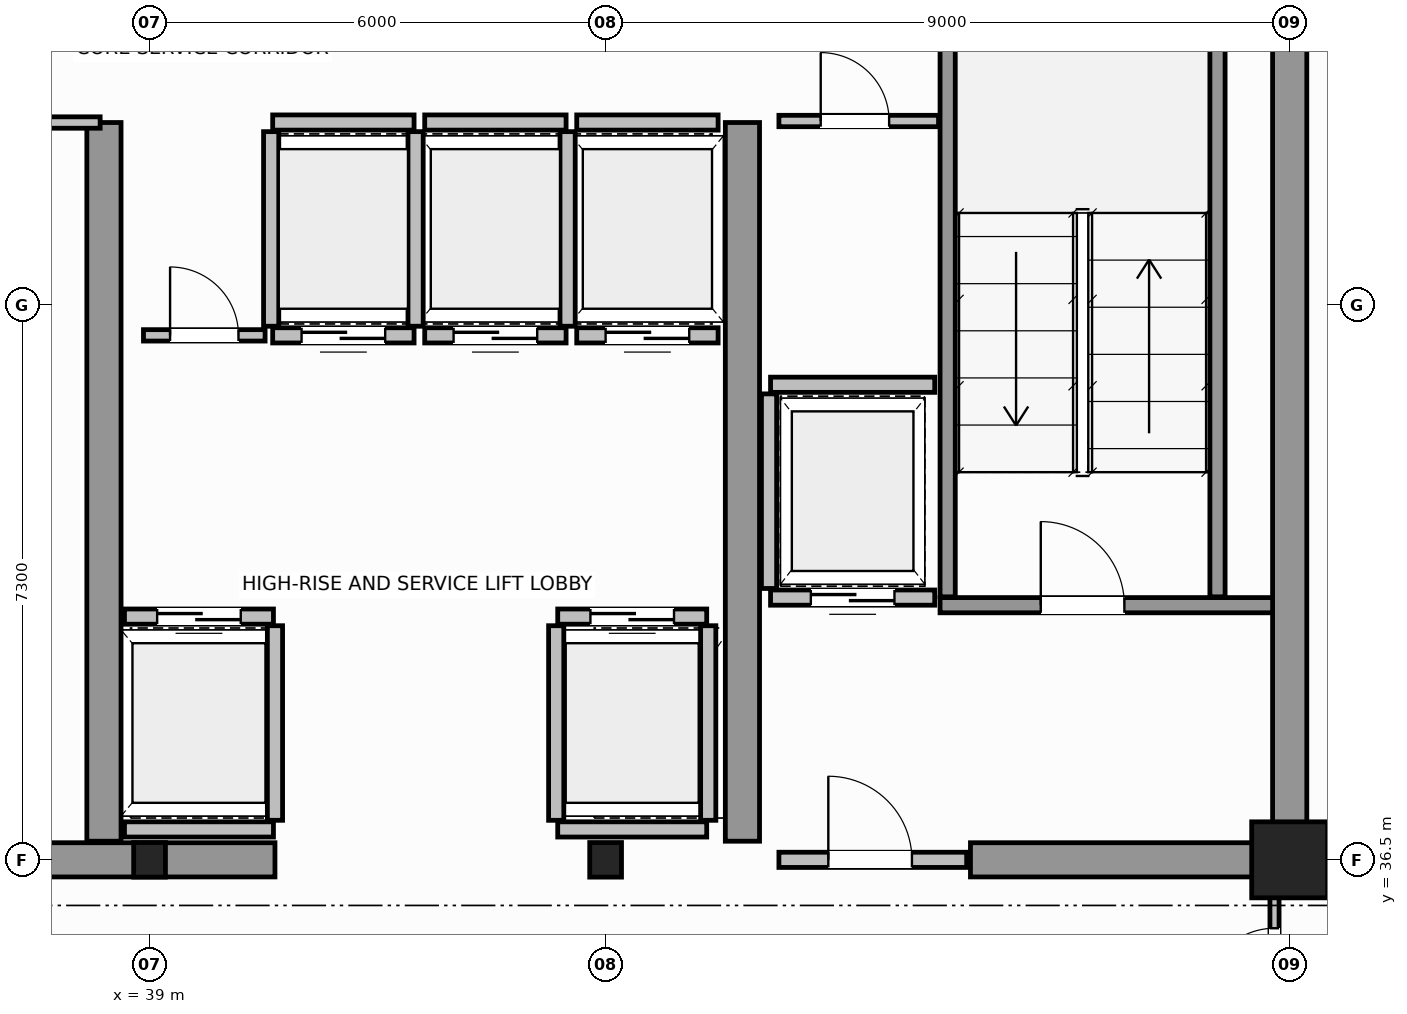
"""IFC4 building model, lengths in metres.
Left out: names, types, materials, properties, quantities, classifications, styles, units other than length and angle.
Written with IfcOpenShell. Run it as: python <this file> out.ifc"""

import sys

from ifc_helpers import new_model, si_unit, direction, frame, frame_2d, origin, origin_2d, place, context, subcontext, project, spatial, rectangle, i_section, extrude, source, transform, mapped, element, fill, save


model = new_model("IFC4")
c1 = context("Model", 3, precision=1e-05, world=origin(), true_north=direction((0.0, 1.0)))
c2 = subcontext(c1, "Body", "Model", "MODEL_VIEW")
j1 = project(units=[si_unit("LENGTHUNIT", "METRE"), si_unit("PLANEANGLEUNIT", "RADIAN")], contexts=[c1])
p1 = place(None, origin())
s1 = spatial("IfcSite", under=j1, at=p1, CompositionType="ELEMENT")
p2 = place(p1, origin())
s2 = spatial("IfcBuilding", under=s1, at=p2, CompositionType="ELEMENT")
p3 = place(p2, frame((0.0, 0.0, 257.4)))
s3 = spatial("IfcBuildingStorey", under=s2, at=p3, CompositionType="ELEMENT", Elevation=257.4)
m1 = source(origin(), c2, "Body", "SweptSolid", [
    extrude(i_section(OverallWidth=0.418, OverallDepth=0.455, WebThickness=0.042, FlangeThickness=0.058, FilletRadius=0.015, at=origin_2d()), origin(), (0.0, 0.0, 1.0), 3.8),
])
for number, where, z_axis, x_axis in (
    (1, (39.0, 36.5, 0.0), (0.0, 0.0, 1.0), (1.0, 0.0, 0.0)),
    (2, (45.0, 36.5, 0.0), (0.0, 0.0, 1.0), (1.0, 0.0, 0.0)),
):
    element("IfcColumn", number, at=place(p3, frame(where, z_axis=z_axis, x_axis=x_axis)), inside=s3, PredefinedType="COLUMN", context=c2, shape_type="MappedRepresentation", body=[
        mapped(m1, transform((0.0, 0.0, 0.0), scale=1.0)),
    ])
m2 = source(origin(), c2, "Body", "SweptSolid", [
    extrude(rectangle(XDim=1.0, YDim=1.0, at=origin_2d()), origin(), (0.0, 0.0, 1.0), 3.8),
])
p4 = place(p3, frame((54.0, 36.5, 0.0), z_axis=(0.0, 0.0, 1.0), x_axis=(1.0, 0.0, 0.0)))
e3 = element("IfcColumn", 3, at=p4, inside=s3, PredefinedType="COLUMN", context=c2, shape_type="MappedRepresentation", body=[
    mapped(m2, transform((0.0, 0.0, 0.0), scale=1.0)),
])
p5 = place(p3, frame((54.0, 36.5, 0.0), z_axis=(0.0, 0.0, 1.0), x_axis=(0.0, 1.0, 0.0)))
e4 = element("IfcWall", 4, at=p5, inside=s3, PredefinedType="SHEAR", context=c2, shape_type="SweptSolid", body=[
    extrude(rectangle(XDim=14.5, YDim=0.45, at=frame_2d((7.25, 0.0))), origin(), (0.0, 0.0, 1.0), 3.8),
])
p6 = place(p3, frame((36.15, 36.5, 0.0), z_axis=(0.0, 0.0, 1.0), x_axis=(1.0, 0.0, 0.0)))
e5 = element("IfcWall", 5, at=p6, inside=s3, PredefinedType="SHEAR", context=c2, shape_type="SweptSolid", body=[
    extrude(rectangle(XDim=4.5, YDim=0.45, at=frame_2d((2.25, 0.0))), origin(), (0.0, 0.0, 1.0), 3.8),
])
p7 = place(p3, frame((49.8, 36.5, 0.0), z_axis=(0.0, 0.0, 1.0), x_axis=(1.0, 0.0, 0.0)))
e6 = element("IfcWall", 6, at=p7, inside=s3, PredefinedType="SHEAR", context=c2, shape_type="SweptSolid", body=[
    extrude(rectangle(XDim=3.955, YDim=0.45, at=frame_2d((1.978, 0.0))), origin(), (0.0, 0.0, 1.0), 2.58),
])
for number, where, z_axis, x_axis in (
    (7, (38.4, 36.745, 0.0), (0.0, 0.0, 1.0), (0.0, 1.0, 0.0)),
    (8, (46.8, 36.745, 0.0), (0.0, 0.0, 1.0), (0.0, 1.0, 0.0)),
):
    element("IfcWall", number, at=place(p3, frame(where, z_axis=z_axis, x_axis=x_axis)), inside=s3, PredefinedType="SHEAR", context=c2, shape_type="SweptSolid", body=[
        extrude(rectangle(XDim=9.455, YDim=0.45, at=frame_2d((4.728, 0.0))), origin(), (0.0, 0.0, 1.0), 3.8),
    ])
p8 = place(p3, frame((49.4, 39.85, 0.0), z_axis=(0.0, 0.0, 1.0), x_axis=(1.0, 0.0, 0.0)))
e9 = element("IfcWall", 9, at=p8, inside=s3, PredefinedType="SOLIDWALL", context=c2, shape_type="SweptSolid", body=[
    extrude(rectangle(XDim=4.375, YDim=0.2, at=frame_2d((2.188, 0.0))), origin(), (0.0, 0.0, 1.0), 3.8),
])
p9 = place(p8, frame((1.325, 0.0, 0.0)))
e10 = element("IfcOpeningElement", 10, at=p9, cuts=e9, PredefinedType="OPENING", context=c2, shape_type="SweptSolid", body=[
    extrude(rectangle(XDim=1.1, YDim=2.15, at=frame_2d((0.55, 1.075))), frame((0.0, 0.11, 0.0), z_axis=(0.0, -1.0, 0.0), x_axis=(1.0, 0.0, 0.0)), (0.0, 0.0, 1.0), 0.22),
])
for number, where, z_axis, x_axis in (
    (11, (49.5, 39.96, 0.0), (0.0, 0.0, 1.0), (0.0, 1.0, 0.0)),
    (12, (53.05, 39.96, 0.0), (0.0, 0.0, 1.0), (0.0, 1.0, 0.0)),
):
    element("IfcWall", number, at=place(p3, frame(where, z_axis=z_axis, x_axis=x_axis)), inside=s3, PredefinedType="SOLIDWALL", context=c2, shape_type="SweptSolid", body=[
        extrude(rectangle(XDim=9.93, YDim=0.2, at=frame_2d((4.965, 0.0))), origin(), (0.0, 0.0, 1.0), 3.8),
    ])
p10 = place(p3, frame((47.28, 36.5, 0.0), z_axis=(0.0, 0.0, 1.0), x_axis=(1.0, 0.0, 0.0)))
e13 = element("IfcWall", 13, at=p10, inside=s3, PredefinedType="SOLIDWALL", context=c2, shape_type="SweptSolid", body=[
    extrude(rectangle(XDim=2.47, YDim=0.2, at=frame_2d((1.235, 0.0))), origin(), (0.0, 0.0, 1.0), 2.57),
])
p11 = place(p10, frame((0.65, 0.0, 0.0)))
e14 = element("IfcOpeningElement", 14, at=p11, cuts=e13, PredefinedType="OPENING", context=c2, shape_type="SweptSolid", body=[
    extrude(rectangle(XDim=1.1, YDim=2.15, at=frame_2d((0.55, 1.075))), frame((0.0, 0.11, 0.0), z_axis=(0.0, -1.0, 0.0), x_axis=(1.0, 0.0, 0.0)), (0.0, 0.0, 1.0), 0.22),
])
p12 = place(p3, frame((38.67, 39.7, 0.0), z_axis=(0.0, 0.0, 1.0), x_axis=(1.0, 0.0, 0.0)))
e15 = element("IfcWall", 15, at=p12, inside=s3, PredefinedType="SOLIDWALL", context=c2, shape_type="SweptSolid", body=[
    extrude(rectangle(XDim=1.96, YDim=0.2, at=frame_2d((0.98, 0.0))), origin(), (0.0, 0.0, 1.0), 3.58),
])
p13 = place(p12, frame((0.43, 0.0, 0.0)))
e16 = element("IfcOpeningElement", 16, at=p13, cuts=e15, PredefinedType="OPENING", context=c2, shape_type="SweptSolid", body=[
    extrude(rectangle(XDim=1.1, YDim=2.15, at=frame_2d((0.55, 1.075))), frame((0.0, 0.11, 0.0), z_axis=(0.0, -1.0, 0.0), x_axis=(1.0, 0.0, 0.0)), (0.0, 0.0, 1.0), 0.22),
])
p14 = place(p3, frame((38.67, 36.9, 0.0), z_axis=(0.0, 0.0, 1.0), x_axis=(1.0, 0.0, 0.0)))
e17 = element("IfcWall", 17, at=p14, inside=s3, PredefinedType="SOLIDWALL", context=c2, shape_type="SweptSolid", body=[
    extrude(rectangle(XDim=1.96, YDim=0.2, at=frame_2d((0.98, 0.0))), origin(), (0.0, 0.0, 1.0), 3.58),
])
p15 = place(p3, frame((40.65, 37.02, 0.0), z_axis=(0.0, 0.0, 1.0), x_axis=(0.0, 1.0, 0.0)))
e18 = element("IfcWall", 18, at=p15, inside=s3, PredefinedType="SOLIDWALL", context=c2, shape_type="SweptSolid", body=[
    extrude(rectangle(XDim=2.56, YDim=0.2, at=frame_2d((1.28, 0.0))), origin(), (0.0, 0.0, 1.0), 3.58),
])
p16 = place(p3, frame((44.37, 39.7, 0.0), z_axis=(0.0, 0.0, 1.0), x_axis=(1.0, 0.0, 0.0)))
e19 = element("IfcWall", 19, at=p16, inside=s3, PredefinedType="SOLIDWALL", context=c2, shape_type="SweptSolid", body=[
    extrude(rectangle(XDim=1.96, YDim=0.2, at=frame_2d((0.98, 0.0))), origin(), (0.0, 0.0, 1.0), 3.58),
])
p17 = place(p16, frame((0.43, 0.0, 0.0)))
e20 = element("IfcOpeningElement", 20, at=p17, cuts=e19, PredefinedType="OPENING", context=c2, shape_type="SweptSolid", body=[
    extrude(rectangle(XDim=1.1, YDim=2.15, at=frame_2d((0.55, 1.075))), frame((0.0, 0.11, 0.0), z_axis=(0.0, -1.0, 0.0), x_axis=(1.0, 0.0, 0.0)), (0.0, 0.0, 1.0), 0.22),
])
p18 = place(p3, frame((44.37, 36.9, 0.0), z_axis=(0.0, 0.0, 1.0), x_axis=(1.0, 0.0, 0.0)))
e21 = element("IfcWall", 21, at=p18, inside=s3, PredefinedType="SOLIDWALL", context=c2, shape_type="SweptSolid", body=[
    extrude(rectangle(XDim=1.96, YDim=0.2, at=frame_2d((0.98, 0.0))), origin(), (0.0, 0.0, 1.0), 2.57),
])
for number, where, z_axis, x_axis in (
    (22, (44.35, 37.02, 0.0), (0.0, 0.0, 1.0), (0.0, 1.0, 0.0)),
    (23, (46.35, 37.02, 0.0), (0.0, 0.0, 1.0), (0.0, 1.0, 0.0)),
):
    element("IfcWall", number, at=place(p3, frame(where, z_axis=z_axis, x_axis=x_axis)), inside=s3, PredefinedType="SOLIDWALL", context=c2, shape_type="SweptSolid", body=[
        extrude(rectangle(XDim=2.56, YDim=0.2, at=frame_2d((1.28, 0.0))), origin(), (0.0, 0.0, 1.0), 3.58),
    ])
p19 = place(p3, frame((40.62, 43.4, 0.0), z_axis=(0.0, 0.0, 1.0), x_axis=(1.0, 0.0, 0.0)))
e24 = element("IfcWall", 24, at=p19, inside=s3, PredefinedType="SOLIDWALL", context=c2, shape_type="SweptSolid", body=[
    extrude(rectangle(XDim=1.86, YDim=0.2, at=frame_2d((0.93, 0.0))), origin(), (0.0, 0.0, 1.0), 3.58),
])
p20 = place(p19, frame((0.38, 0.0, 0.0)))
e25 = element("IfcOpeningElement", 25, at=p20, cuts=e24, PredefinedType="OPENING", context=c2, shape_type="SweptSolid", body=[
    extrude(rectangle(XDim=1.1, YDim=2.15, at=frame_2d((0.55, 1.075))), frame((0.0, 0.11, 0.0), z_axis=(0.0, -1.0, 0.0), x_axis=(1.0, 0.0, 0.0)), (0.0, 0.0, 1.0), 0.22),
])
p21 = place(p3, frame((40.62, 46.2, 0.0), z_axis=(0.0, 0.0, 1.0), x_axis=(1.0, 0.0, 0.0)))
e26 = element("IfcWall", 26, at=p21, inside=s3, PredefinedType="SOLIDWALL", context=c2, shape_type="SweptSolid", body=[
    extrude(rectangle(XDim=1.86, YDim=0.2, at=frame_2d((0.93, 0.0))), origin(), (0.0, 0.0, 1.0), 3.58),
])
for number, where, z_axis, x_axis in (
    (27, (40.6, 43.52, 0.0), (0.0, 0.0, 1.0), (0.0, 1.0, 0.0)),
    (28, (42.5, 43.52, 0.0), (0.0, 0.0, 1.0), (0.0, 1.0, 0.0)),
):
    element("IfcWall", number, at=place(p3, frame(where, z_axis=z_axis, x_axis=x_axis)), inside=s3, PredefinedType="SOLIDWALL", context=c2, shape_type="SweptSolid", body=[
        extrude(rectangle(XDim=2.56, YDim=0.2, at=frame_2d((1.28, 0.0))), origin(), (0.0, 0.0, 1.0), 3.58),
    ])
p22 = place(p3, frame((42.62, 43.4, 0.0), z_axis=(0.0, 0.0, 1.0), x_axis=(1.0, 0.0, 0.0)))
e29 = element("IfcWall", 29, at=p22, inside=s3, PredefinedType="SOLIDWALL", context=c2, shape_type="SweptSolid", body=[
    extrude(rectangle(XDim=1.86, YDim=0.2, at=frame_2d((0.93, 0.0))), origin(), (0.0, 0.0, 1.0), 3.58),
])
p23 = place(p22, frame((0.38, 0.0, 0.0)))
e30 = element("IfcOpeningElement", 30, at=p23, cuts=e29, PredefinedType="OPENING", context=c2, shape_type="SweptSolid", body=[
    extrude(rectangle(XDim=1.1, YDim=2.15, at=frame_2d((0.55, 1.075))), frame((0.0, 0.11, 0.0), z_axis=(0.0, -1.0, 0.0), x_axis=(1.0, 0.0, 0.0)), (0.0, 0.0, 1.0), 0.22),
])
p24 = place(p3, frame((42.62, 46.2, 0.0), z_axis=(0.0, 0.0, 1.0), x_axis=(1.0, 0.0, 0.0)))
e31 = element("IfcWall", 31, at=p24, inside=s3, PredefinedType="SOLIDWALL", context=c2, shape_type="SweptSolid", body=[
    extrude(rectangle(XDim=1.86, YDim=0.2, at=frame_2d((0.93, 0.0))), origin(), (0.0, 0.0, 1.0), 3.58),
])
p25 = place(p3, frame((44.5, 43.52, 0.0), z_axis=(0.0, 0.0, 1.0), x_axis=(0.0, 1.0, 0.0)))
e32 = element("IfcWall", 32, at=p25, inside=s3, PredefinedType="SOLIDWALL", context=c2, shape_type="SweptSolid", body=[
    extrude(rectangle(XDim=2.56, YDim=0.2, at=frame_2d((1.28, 0.0))), origin(), (0.0, 0.0, 1.0), 3.58),
])
p26 = place(p3, frame((44.62, 43.4, 0.0), z_axis=(0.0, 0.0, 1.0), x_axis=(1.0, 0.0, 0.0)))
e33 = element("IfcWall", 33, at=p26, inside=s3, PredefinedType="SOLIDWALL", context=c2, shape_type="SweptSolid", body=[
    extrude(rectangle(XDim=1.86, YDim=0.2, at=frame_2d((0.93, 0.0))), origin(), (0.0, 0.0, 1.0), 3.58),
])
p27 = place(p26, frame((0.38, 0.0, 0.0)))
e34 = element("IfcOpeningElement", 34, at=p27, cuts=e33, PredefinedType="OPENING", context=c2, shape_type="SweptSolid", body=[
    extrude(rectangle(XDim=1.1, YDim=2.15, at=frame_2d((0.55, 1.075))), frame((0.0, 0.11, 0.0), z_axis=(0.0, -1.0, 0.0), x_axis=(1.0, 0.0, 0.0)), (0.0, 0.0, 1.0), 0.22),
])
p28 = place(p3, frame((44.62, 46.2, 0.0), z_axis=(0.0, 0.0, 1.0), x_axis=(1.0, 0.0, 0.0)))
e35 = element("IfcWall", 35, at=p28, inside=s3, PredefinedType="SOLIDWALL", context=c2, shape_type="SweptSolid", body=[
    extrude(rectangle(XDim=1.86, YDim=0.2, at=frame_2d((0.93, 0.0))), origin(), (0.0, 0.0, 1.0), 3.58),
])
p29 = place(p3, frame((47.17, 39.95, 0.0), z_axis=(0.0, 0.0, 1.0), x_axis=(1.0, 0.0, 0.0)))
e36 = element("IfcWall", 36, at=p29, inside=s3, PredefinedType="SOLIDWALL", context=c2, shape_type="SweptSolid", body=[
    extrude(rectangle(XDim=2.16, YDim=0.2, at=frame_2d((1.08, 0.0))), origin(), (0.0, 0.0, 1.0), 3.58),
])
p30 = place(p29, frame((0.53, 0.0, 0.0)))
e37 = element("IfcOpeningElement", 37, at=p30, cuts=e36, PredefinedType="OPENING", context=c2, shape_type="SweptSolid", body=[
    extrude(rectangle(XDim=1.1, YDim=2.15, at=frame_2d((0.55, 1.075))), frame((0.0, 0.11, 0.0), z_axis=(0.0, -1.0, 0.0), x_axis=(1.0, 0.0, 0.0)), (0.0, 0.0, 1.0), 0.22),
])
p31 = place(p3, frame((47.17, 42.75, 0.0), z_axis=(0.0, 0.0, 1.0), x_axis=(1.0, 0.0, 0.0)))
e38 = element("IfcWall", 38, at=p31, inside=s3, PredefinedType="SOLIDWALL", context=c2, shape_type="SweptSolid", body=[
    extrude(rectangle(XDim=2.16, YDim=0.2, at=frame_2d((1.08, 0.0))), origin(), (0.0, 0.0, 1.0), 3.58),
])
p32 = place(p3, frame((47.15, 40.07, 0.0), z_axis=(0.0, 0.0, 1.0), x_axis=(0.0, 1.0, 0.0)))
e39 = element("IfcWall", 39, at=p32, inside=s3, PredefinedType="SOLIDWALL", context=c2, shape_type="SweptSolid", body=[
    extrude(rectangle(XDim=2.56, YDim=0.2, at=frame_2d((1.28, 0.0))), origin(), (0.0, 0.0, 1.0), 3.58),
])
p33 = place(p3, frame((29.85, 46.2, 0.0), z_axis=(0.0, 0.0, 1.0), x_axis=(1.0, 0.0, 0.0)))
e40 = element("IfcWall", 40, at=p33, inside=s3, PredefinedType="PARTITIONING", context=c2, shape_type="SweptSolid", body=[
    extrude(rectangle(XDim=8.5, YDim=0.15, at=frame_2d((4.25, 0.0))), origin(), (0.0, 0.0, 1.0), 3.58),
])
p34 = place(p3, frame((47.28, 46.22, 0.0), z_axis=(0.0, 0.0, 1.0), x_axis=(1.0, 0.0, 0.0)))
e41 = element("IfcWall", 41, at=p34, inside=s3, PredefinedType="PARTITIONING", context=c2, shape_type="SweptSolid", body=[
    extrude(rectangle(XDim=2.1, YDim=0.15, at=frame_2d((1.05, 0.0))), origin(), (0.0, 0.0, 1.0), 3.58),
])
p35 = place(p34, frame((0.55, 0.0, 0.0)))
e42 = element("IfcOpeningElement", 42, at=p35, cuts=e41, PredefinedType="OPENING", context=c2, shape_type="SweptSolid", body=[
    extrude(rectangle(XDim=0.9, YDim=2.1, at=frame_2d((0.45, 1.05))), frame((0.0, 0.085, 0.0), z_axis=(0.0, -1.0, 0.0), x_axis=(1.0, 0.0, 0.0)), (0.0, 0.0, 1.0), 0.17),
])
p36 = place(p3, frame((38.92, 43.4, 0.0), z_axis=(0.0, 0.0, 1.0), x_axis=(1.0, 0.0, 0.0)))
e43 = element("IfcWall", 43, at=p36, inside=s3, PredefinedType="PARTITIONING", context=c2, shape_type="SweptSolid", body=[
    extrude(rectangle(XDim=1.6, YDim=0.15, at=frame_2d((0.8, 0.0))), origin(), (0.0, 0.0, 1.0), 3.58),
])
p37 = place(p36, frame((0.35, 0.0, 0.0)))
e44 = element("IfcOpeningElement", 44, at=p37, cuts=e43, PredefinedType="OPENING", context=c2, shape_type="SweptSolid", body=[
    extrude(rectangle(XDim=0.9, YDim=2.1, at=frame_2d((0.45, 1.05))), frame((0.0, 0.085, 0.0), z_axis=(0.0, -1.0, 0.0), x_axis=(1.0, 0.0, 0.0)), (0.0, 0.0, 1.0), 0.17),
])
p38 = place(p3, frame((53.8, 34.0, 0.0), z_axis=(0.0, 0.0, 1.0), x_axis=(0.0, 1.0, 0.0)))
e45 = element("IfcWall", 45, at=p38, inside=s3, PredefinedType="PARTITIONING", context=c2, shape_type="SweptSolid", body=[
    extrude(rectangle(XDim=2.44, YDim=0.12, at=frame_2d((1.22, 0.0))), origin(), (0.0, 0.0, 1.0), 3.58),
])
p39 = place(p38, frame((0.7, 0.0, 0.0)))
e46 = element("IfcOpeningElement", 46, at=p39, cuts=e45, PredefinedType="OPENING", context=c2, shape_type="SweptSolid", body=[
    extrude(rectangle(XDim=0.9, YDim=2.15, at=frame_2d((0.45, 1.075))), frame((0.0, 0.07, 0.0), z_axis=(0.0, -1.0, 0.0), x_axis=(1.0, 0.0, 0.0)), (0.0, 0.0, 1.0), 0.14),
])
m3 = source(origin(), c2, "Body", "SweptSolid", [
    extrude(rectangle(XDim=1.1, YDim=2.15, at=frame_2d((0.55, 1.075))), frame((0.0, 0.025, 0.0), z_axis=(0.0, -1.0, 0.0), x_axis=(1.0, 0.0, 0.0)), (0.0, 0.0, 1.0), 0.05),
])
p40 = place(p9, origin())
e47 = element("IfcDoor", 47, at=p40, inside=s3, OperationType="SINGLE_SWING_RIGHT", PredefinedType="DOOR", context=c2, shape_type="MappedRepresentation", body=[
    mapped(m3, transform((0.0, 0.0, 0.0), scale=1.0)),
])
fill(e10, e47)
p41 = place(p11, origin())
e48 = element("IfcDoor", 48, at=p41, inside=s3, OperationType="SINGLE_SWING_LEFT", PredefinedType="DOOR", context=c2, shape_type="MappedRepresentation", body=[
    mapped(m3, transform((0.0, 0.0, 0.0), scale=1.0)),
])
fill(e14, e48)
p42 = place(p13, origin())
e49 = element("IfcDoor", 49, at=p42, inside=s3, OperationType="DOUBLE_DOOR_SLIDING", PredefinedType="DOOR", context=c2, shape_type="MappedRepresentation", body=[
    mapped(m3, transform((0.0, 0.0, 0.0), scale=1.0)),
])
fill(e16, e49)
p43 = place(p17, origin())
e50 = element("IfcDoor", 50, at=p43, inside=s3, OperationType="DOUBLE_DOOR_SLIDING", PredefinedType="DOOR", context=c2, shape_type="MappedRepresentation", body=[
    mapped(m3, transform((0.0, 0.0, 0.0), scale=1.0)),
])
fill(e20, e50)
p44 = place(p20, origin())
e51 = element("IfcDoor", 51, at=p44, inside=s3, OperationType="DOUBLE_DOOR_SLIDING", PredefinedType="DOOR", context=c2, shape_type="MappedRepresentation", body=[
    mapped(m3, transform((0.0, 0.0, 0.0), scale=1.0)),
])
fill(e25, e51)
p45 = place(p23, origin())
e52 = element("IfcDoor", 52, at=p45, inside=s3, OperationType="DOUBLE_DOOR_SLIDING", PredefinedType="DOOR", context=c2, shape_type="MappedRepresentation", body=[
    mapped(m3, transform((0.0, 0.0, 0.0), scale=1.0)),
])
fill(e30, e52)
p46 = place(p27, origin())
e53 = element("IfcDoor", 53, at=p46, inside=s3, OperationType="DOUBLE_DOOR_SLIDING", PredefinedType="DOOR", context=c2, shape_type="MappedRepresentation", body=[
    mapped(m3, transform((0.0, 0.0, 0.0), scale=1.0)),
])
fill(e34, e53)
p47 = place(p30, origin())
e54 = element("IfcDoor", 54, at=p47, inside=s3, OperationType="DOUBLE_DOOR_SLIDING", PredefinedType="DOOR", context=c2, shape_type="MappedRepresentation", body=[
    mapped(m3, transform((0.0, 0.0, 0.0), scale=1.0)),
])
fill(e37, e54)
m4 = source(origin(), c2, "Body", "SweptSolid", [
    extrude(rectangle(XDim=0.9, YDim=2.1, at=frame_2d((0.45, 1.05))), frame((0.0, 0.025, 0.0), z_axis=(0.0, -1.0, 0.0), x_axis=(1.0, 0.0, 0.0)), (0.0, 0.0, 1.0), 0.05),
])
p48 = place(p35, origin())
e55 = element("IfcDoor", 55, at=p48, inside=s3, OperationType="SINGLE_SWING_RIGHT", PredefinedType="DOOR", context=c2, shape_type="MappedRepresentation", body=[
    mapped(m4, transform((0.0, 0.0, 0.0), scale=1.0)),
])
fill(e42, e55)
p49 = place(p37, origin())
e56 = element("IfcDoor", 56, at=p49, inside=s3, OperationType="SINGLE_SWING_LEFT", PredefinedType="DOOR", context=c2, shape_type="MappedRepresentation", body=[
    mapped(m4, transform((0.0, 0.0, 0.0), scale=1.0)),
])
fill(e44, e56)
m5 = source(origin(), c2, "Body", "SweptSolid", [
    extrude(rectangle(XDim=0.9, YDim=2.15, at=frame_2d((0.45, 1.075))), frame((0.0, 0.025, 0.0), z_axis=(0.0, -1.0, 0.0), x_axis=(1.0, 0.0, 0.0)), (0.0, 0.0, 1.0), 0.05),
])
p50 = place(p39, origin())
e57 = element("IfcDoor", 57, at=p50, inside=s3, OperationType="SINGLE_SWING_RIGHT", PredefinedType="DOOR", context=c2, shape_type="MappedRepresentation", body=[
    mapped(m5, transform((0.0, 0.0, 0.0), scale=1.0)),
])
fill(e46, e57)
save(model, sys.argv[1])
